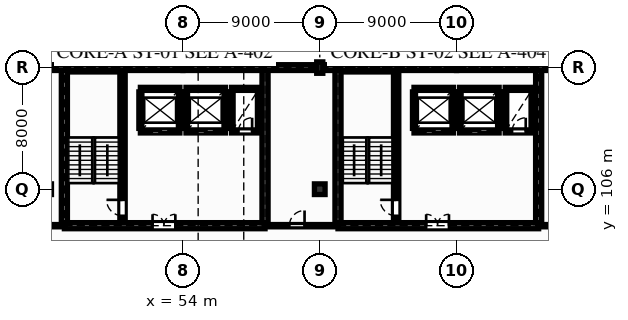
"""IFC4 building model, lengths in metres.
Left out: names, types, materials, properties, quantities, classifications, styles, units other than length and angle.
Written with IfcOpenShell. Run it as: python <this file> out.ifc"""

import sys

from ifc_helpers import new_model, si_unit, direction, frame, frame_2d, origin, origin_2d, place, context, subcontext, project, spatial, rectangle, extrude, element, fill, save


model = new_model("IFC4")
c1 = context("Model", 3, precision=1e-05, world=origin(), true_north=direction((0.0, 1.0)))
c2 = subcontext(c1, "Body", "Model", "MODEL_VIEW")
j1 = project(units=[si_unit("LENGTHUNIT", "METRE"), si_unit("PLANEANGLEUNIT", "RADIAN")], contexts=[c1])
p1 = place(None, origin())
s1 = spatial("IfcSite", under=j1, at=p1, CompositionType="ELEMENT")
p2 = place(p1, origin())
s2 = spatial("IfcBuilding", under=s1, at=p2, CompositionType="ELEMENT")
p3 = place(p2, frame((0.0, 0.0, 12.78)))
s3 = spatial("IfcBuildingStorey", under=s2, at=p3, CompositionType="ELEMENT", Elevation=12.78)
p4 = place(p3, frame((63.0, 106.0, 0.0), z_axis=(0.0, 0.0, 1.0), x_axis=(1.0, 0.0, 0.0)))
e1 = element("IfcColumn", 1, at=p4, inside=s3, PredefinedType="COLUMN", context=c2, shape_type="SweptSolid", body=[
    extrude(rectangle(XDim=0.7, YDim=0.7, at=origin_2d()), origin(), (0.0, 0.0, 1.0), 3.74),
])
p5 = place(p3, frame((63.0, 114.0, 0.0), z_axis=(0.0, 0.0, 1.0), x_axis=(0.0, 1.0, 0.0)))
e2 = element("IfcColumn", 2, at=p5, inside=s3, PredefinedType="COLUMN", context=c2, shape_type="SweptSolid", body=[
    extrude(rectangle(XDim=0.4, YDim=0.75, at=origin_2d()), origin(), (0.0, 0.0, 1.0), 3.74),
])
for number, where, z_axis, x_axis in (
    (3, (45.0, 114.0, 0.0), (0.0, 0.0, 1.0), (1.0, 0.0, 0.0)),
    (4, (54.0, 114.0, 0.0), (0.0, 0.0, 1.0), (1.0, 0.0, 0.0)),
    (5, (63.0, 114.0, 0.0), (0.0, 0.0, 1.0), (1.0, 0.0, 0.0)),
    (6, (72.0, 114.0, 0.0), (0.0, 0.0, 1.0), (1.0, 0.0, 0.0)),
):
    element("IfcWall", number, at=place(p3, frame(where, z_axis=z_axis, x_axis=x_axis)), inside=s3, PredefinedType="SOLIDWALL", context=c2, shape_type="SweptSolid", body=[
        extrude(rectangle(XDim=9.0, YDim=0.38, at=frame_2d((4.5, 0.0))), origin(), (0.0, 0.0, 1.0), 3.42),
    ])
p6 = place(p3, frame((46.2, 103.6, 0.0), z_axis=(0.0, 0.0, 1.0), x_axis=(1.0, 0.0, 0.0)))
e7 = element("IfcWall", 7, at=p6, inside=s3, PredefinedType="SHEAR", context=c2, shape_type="SweptSolid", body=[
    extrude(rectangle(XDim=13.2, YDim=0.4, at=frame_2d((6.6, 0.0))), origin(), (0.0, 0.0, 1.0), 3.42),
])
p7 = place(p6, frame((5.8, 0.0, 0.0)))
e8 = element("IfcOpeningElement", 8, at=p7, cuts=e7, PredefinedType="OPENING", context=c2, shape_type="SweptSolid", body=[
    extrude(rectangle(XDim=1.5, YDim=2.2, at=frame_2d((0.75, 1.1))), frame((0.0, 0.21, 0.0), z_axis=(0.0, -1.0, 0.0), x_axis=(1.0, 0.0, 0.0)), (0.0, 0.0, 1.0), 0.42),
])
for number, where, z_axis, x_axis in (
    (9, (46.2, 103.8, 0.0), (0.0, 0.0, 1.0), (0.0, 1.0, 0.0)),
    (10, (59.4, 103.8, 0.0), (0.0, 0.0, 1.0), (0.0, 1.0, 0.0)),
):
    element("IfcWall", number, at=place(p3, frame(where, z_axis=z_axis, x_axis=x_axis)), inside=s3, PredefinedType="SHEAR", context=c2, shape_type="SweptSolid", body=[
        extrude(rectangle(XDim=10.01, YDim=0.4, at=frame_2d((5.005, 0.0))), origin(), (0.0, 0.0, 1.0), 3.42),
    ])
p8 = place(p3, frame((50.025, 103.8, 0.0), z_axis=(0.0, 0.0, 1.0), x_axis=(0.0, 1.0, 0.0)))
e11 = element("IfcWall", 11, at=p8, inside=s3, PredefinedType="SHEAR", context=c2, shape_type="SweptSolid", body=[
    extrude(rectangle(XDim=10.01, YDim=0.35, at=frame_2d((5.005, 0.0))), origin(), (0.0, 0.0, 1.0), 3.42),
])
p9 = place(p8, frame((0.45, 0.0, 0.0)))
e12 = element("IfcOpeningElement", 12, at=p9, cuts=e11, PredefinedType="OPENING", context=c2, shape_type="SweptSolid", body=[
    extrude(rectangle(XDim=1.05, YDim=2.2, at=frame_2d((0.525, 1.1))), frame((0.0, 0.185, 0.0), z_axis=(0.0, -1.0, 0.0), x_axis=(1.0, 0.0, 0.0)), (0.0, 0.0, 1.0), 0.37),
])
p10 = place(p3, frame((51.2, 109.8, 0.0), z_axis=(0.0, 0.0, 1.0), x_axis=(1.0, 0.0, 0.0)))
e13 = element("IfcWall", 13, at=p10, inside=s3, PredefinedType="PARTITIONING", context=c2, shape_type="SweptSolid", body=[
    extrude(rectangle(XDim=2.6, YDim=0.2, at=frame_2d((1.3, 0.0))), origin(), (0.0, 0.0, 1.0), 3.42),
])
p11 = place(p10, frame((0.75, 0.0, 0.0)))
e14 = element("IfcOpeningElement", 14, at=p11, cuts=e13, PredefinedType="OPENING", context=c2, shape_type="SweptSolid", body=[
    extrude(rectangle(XDim=1.1, YDim=2.15, at=frame_2d((0.55, 1.075))), frame((0.0, 0.11, 0.0), z_axis=(0.0, -1.0, 0.0), x_axis=(1.0, 0.0, 0.0)), (0.0, 0.0, 1.0), 0.22),
])
p12 = place(p3, frame((51.2, 112.6, 0.0), z_axis=(0.0, 0.0, 1.0), x_axis=(1.0, 0.0, 0.0)))
e15 = element("IfcWall", 15, at=p12, inside=s3, PredefinedType="PARTITIONING", context=c2, shape_type="SweptSolid", body=[
    extrude(rectangle(XDim=2.6, YDim=0.2, at=frame_2d((1.3, 0.0))), origin(), (0.0, 0.0, 1.0), 3.42),
])
for number, where, z_axis, x_axis in (
    (16, (51.2, 110.0, 0.0), (0.0, 0.0, 1.0), (0.0, 1.0, 0.0)),
    (17, (53.8, 110.0, 0.0), (0.0, 0.0, 1.0), (0.0, 1.0, 0.0)),
):
    element("IfcWall", number, at=place(p3, frame(where, z_axis=z_axis, x_axis=x_axis)), inside=s3, PredefinedType="PARTITIONING", context=c2, shape_type="SweptSolid", body=[
        extrude(rectangle(XDim=2.4, YDim=0.2, at=frame_2d((1.2, 0.0))), origin(), (0.0, 0.0, 1.0), 3.42),
    ])
p13 = place(p3, frame((54.2, 109.8, 0.0), z_axis=(0.0, 0.0, 1.0), x_axis=(1.0, 0.0, 0.0)))
e18 = element("IfcWall", 18, at=p13, inside=s3, PredefinedType="PARTITIONING", context=c2, shape_type="SweptSolid", body=[
    extrude(rectangle(XDim=2.6, YDim=0.2, at=frame_2d((1.3, 0.0))), origin(), (0.0, 0.0, 1.0), 3.42),
])
p14 = place(p13, frame((0.75, 0.0, 0.0)))
e19 = element("IfcOpeningElement", 19, at=p14, cuts=e18, PredefinedType="OPENING", context=c2, shape_type="SweptSolid", body=[
    extrude(rectangle(XDim=1.1, YDim=2.15, at=frame_2d((0.55, 1.075))), frame((0.0, 0.11, 0.0), z_axis=(0.0, -1.0, 0.0), x_axis=(1.0, 0.0, 0.0)), (0.0, 0.0, 1.0), 0.22),
])
p15 = place(p3, frame((54.2, 112.6, 0.0), z_axis=(0.0, 0.0, 1.0), x_axis=(1.0, 0.0, 0.0)))
e20 = element("IfcWall", 20, at=p15, inside=s3, PredefinedType="PARTITIONING", context=c2, shape_type="SweptSolid", body=[
    extrude(rectangle(XDim=2.6, YDim=0.2, at=frame_2d((1.3, 0.0))), origin(), (0.0, 0.0, 1.0), 3.42),
])
for number, where, z_axis, x_axis in (
    (21, (54.2, 110.0, 0.0), (0.0, 0.0, 1.0), (0.0, 1.0, 0.0)),
    (22, (56.8, 110.0, 0.0), (0.0, 0.0, 1.0), (0.0, 1.0, 0.0)),
):
    element("IfcWall", number, at=place(p3, frame(where, z_axis=z_axis, x_axis=x_axis)), inside=s3, PredefinedType="PARTITIONING", context=c2, shape_type="SweptSolid", body=[
        extrude(rectangle(XDim=2.4, YDim=0.2, at=frame_2d((1.2, 0.0))), origin(), (0.0, 0.0, 1.0), 3.42),
    ])
p16 = place(p3, frame((57.2, 109.8, 0.0), z_axis=(0.0, 0.0, 1.0), x_axis=(1.0, 0.0, 0.0)))
e23 = element("IfcWall", 23, at=p16, inside=s3, PredefinedType="PARTITIONING", context=c2, shape_type="SweptSolid", body=[
    extrude(rectangle(XDim=1.8, YDim=0.2, at=frame_2d((0.9, 0.0))), origin(), (0.0, 0.0, 1.0), 3.42),
])
p17 = place(p16, frame((0.45, 0.0, 0.0)))
e24 = element("IfcOpeningElement", 24, at=p17, cuts=e23, PredefinedType="OPENING", context=c2, shape_type="SweptSolid", body=[
    extrude(rectangle(XDim=0.9, YDim=2.1, at=frame_2d((0.45, 1.05))), frame((0.0, 0.11, 0.0), z_axis=(0.0, -1.0, 0.0), x_axis=(1.0, 0.0, 0.0)), (0.0, 0.0, 1.0), 0.22),
])
p18 = place(p3, frame((57.2, 112.6, 0.0), z_axis=(0.0, 0.0, 1.0), x_axis=(1.0, 0.0, 0.0)))
e25 = element("IfcWall", 25, at=p18, inside=s3, PredefinedType="PARTITIONING", context=c2, shape_type="SweptSolid", body=[
    extrude(rectangle(XDim=1.8, YDim=0.2, at=frame_2d((0.9, 0.0))), origin(), (0.0, 0.0, 1.0), 3.42),
])
for number, where, z_axis, x_axis in (
    (26, (57.2, 110.0, 0.0), (0.0, 0.0, 1.0), (0.0, 1.0, 0.0)),
    (27, (59.0, 110.0, 0.0), (0.0, 0.0, 1.0), (0.0, 1.0, 0.0)),
):
    element("IfcWall", number, at=place(p3, frame(where, z_axis=z_axis, x_axis=x_axis)), inside=s3, PredefinedType="PARTITIONING", context=c2, shape_type="SweptSolid", body=[
        extrude(rectangle(XDim=2.4, YDim=0.2, at=frame_2d((1.2, 0.0))), origin(), (0.0, 0.0, 1.0), 3.42),
    ])
p19 = place(p3, frame((64.2, 103.6, 0.0), z_axis=(0.0, 0.0, 1.0), x_axis=(1.0, 0.0, 0.0)))
e28 = element("IfcWall", 28, at=p19, inside=s3, PredefinedType="SHEAR", context=c2, shape_type="SweptSolid", body=[
    extrude(rectangle(XDim=13.2, YDim=0.4, at=frame_2d((6.6, 0.0))), origin(), (0.0, 0.0, 1.0), 3.42),
])
p20 = place(p19, frame((5.8, 0.0, 0.0)))
e29 = element("IfcOpeningElement", 29, at=p20, cuts=e28, PredefinedType="OPENING", context=c2, shape_type="SweptSolid", body=[
    extrude(rectangle(XDim=1.5, YDim=2.2, at=frame_2d((0.75, 1.1))), frame((0.0, 0.21, 0.0), z_axis=(0.0, -1.0, 0.0), x_axis=(1.0, 0.0, 0.0)), (0.0, 0.0, 1.0), 0.42),
])
for number, where, z_axis, x_axis in (
    (30, (64.2, 103.8, 0.0), (0.0, 0.0, 1.0), (0.0, 1.0, 0.0)),
    (31, (77.4, 103.8, 0.0), (0.0, 0.0, 1.0), (0.0, 1.0, 0.0)),
):
    element("IfcWall", number, at=place(p3, frame(where, z_axis=z_axis, x_axis=x_axis)), inside=s3, PredefinedType="SHEAR", context=c2, shape_type="SweptSolid", body=[
        extrude(rectangle(XDim=10.01, YDim=0.4, at=frame_2d((5.005, 0.0))), origin(), (0.0, 0.0, 1.0), 3.42),
    ])
p21 = place(p3, frame((68.025, 103.8, 0.0), z_axis=(0.0, 0.0, 1.0), x_axis=(0.0, 1.0, 0.0)))
e32 = element("IfcWall", 32, at=p21, inside=s3, PredefinedType="SHEAR", context=c2, shape_type="SweptSolid", body=[
    extrude(rectangle(XDim=10.01, YDim=0.35, at=frame_2d((5.005, 0.0))), origin(), (0.0, 0.0, 1.0), 3.42),
])
p22 = place(p21, frame((0.45, 0.0, 0.0)))
e33 = element("IfcOpeningElement", 33, at=p22, cuts=e32, PredefinedType="OPENING", context=c2, shape_type="SweptSolid", body=[
    extrude(rectangle(XDim=1.05, YDim=2.2, at=frame_2d((0.525, 1.1))), frame((0.0, 0.185, 0.0), z_axis=(0.0, -1.0, 0.0), x_axis=(1.0, 0.0, 0.0)), (0.0, 0.0, 1.0), 0.37),
])
p23 = place(p3, frame((69.2, 109.8, 0.0), z_axis=(0.0, 0.0, 1.0), x_axis=(1.0, 0.0, 0.0)))
e34 = element("IfcWall", 34, at=p23, inside=s3, PredefinedType="PARTITIONING", context=c2, shape_type="SweptSolid", body=[
    extrude(rectangle(XDim=2.6, YDim=0.2, at=frame_2d((1.3, 0.0))), origin(), (0.0, 0.0, 1.0), 3.42),
])
p24 = place(p23, frame((0.75, 0.0, 0.0)))
e35 = element("IfcOpeningElement", 35, at=p24, cuts=e34, PredefinedType="OPENING", context=c2, shape_type="SweptSolid", body=[
    extrude(rectangle(XDim=1.1, YDim=2.15, at=frame_2d((0.55, 1.075))), frame((0.0, 0.11, 0.0), z_axis=(0.0, -1.0, 0.0), x_axis=(1.0, 0.0, 0.0)), (0.0, 0.0, 1.0), 0.22),
])
p25 = place(p3, frame((69.2, 112.6, 0.0), z_axis=(0.0, 0.0, 1.0), x_axis=(1.0, 0.0, 0.0)))
e36 = element("IfcWall", 36, at=p25, inside=s3, PredefinedType="PARTITIONING", context=c2, shape_type="SweptSolid", body=[
    extrude(rectangle(XDim=2.6, YDim=0.2, at=frame_2d((1.3, 0.0))), origin(), (0.0, 0.0, 1.0), 3.42),
])
for number, where, z_axis, x_axis in (
    (37, (69.2, 110.0, 0.0), (0.0, 0.0, 1.0), (0.0, 1.0, 0.0)),
    (38, (71.8, 110.0, 0.0), (0.0, 0.0, 1.0), (0.0, 1.0, 0.0)),
):
    element("IfcWall", number, at=place(p3, frame(where, z_axis=z_axis, x_axis=x_axis)), inside=s3, PredefinedType="PARTITIONING", context=c2, shape_type="SweptSolid", body=[
        extrude(rectangle(XDim=2.4, YDim=0.2, at=frame_2d((1.2, 0.0))), origin(), (0.0, 0.0, 1.0), 3.42),
    ])
p26 = place(p3, frame((72.2, 109.8, 0.0), z_axis=(0.0, 0.0, 1.0), x_axis=(1.0, 0.0, 0.0)))
e39 = element("IfcWall", 39, at=p26, inside=s3, PredefinedType="PARTITIONING", context=c2, shape_type="SweptSolid", body=[
    extrude(rectangle(XDim=2.6, YDim=0.2, at=frame_2d((1.3, 0.0))), origin(), (0.0, 0.0, 1.0), 3.42),
])
p27 = place(p26, frame((0.75, 0.0, 0.0)))
e40 = element("IfcOpeningElement", 40, at=p27, cuts=e39, PredefinedType="OPENING", context=c2, shape_type="SweptSolid", body=[
    extrude(rectangle(XDim=1.1, YDim=2.15, at=frame_2d((0.55, 1.075))), frame((0.0, 0.11, 0.0), z_axis=(0.0, -1.0, 0.0), x_axis=(1.0, 0.0, 0.0)), (0.0, 0.0, 1.0), 0.22),
])
p28 = place(p3, frame((72.2, 112.6, 0.0), z_axis=(0.0, 0.0, 1.0), x_axis=(1.0, 0.0, 0.0)))
e41 = element("IfcWall", 41, at=p28, inside=s3, PredefinedType="PARTITIONING", context=c2, shape_type="SweptSolid", body=[
    extrude(rectangle(XDim=2.6, YDim=0.2, at=frame_2d((1.3, 0.0))), origin(), (0.0, 0.0, 1.0), 3.42),
])
for number, where, z_axis, x_axis in (
    (42, (72.2, 110.0, 0.0), (0.0, 0.0, 1.0), (0.0, 1.0, 0.0)),
    (43, (74.8, 110.0, 0.0), (0.0, 0.0, 1.0), (0.0, 1.0, 0.0)),
):
    element("IfcWall", number, at=place(p3, frame(where, z_axis=z_axis, x_axis=x_axis)), inside=s3, PredefinedType="PARTITIONING", context=c2, shape_type="SweptSolid", body=[
        extrude(rectangle(XDim=2.4, YDim=0.2, at=frame_2d((1.2, 0.0))), origin(), (0.0, 0.0, 1.0), 3.42),
    ])
p29 = place(p3, frame((75.2, 109.8, 0.0), z_axis=(0.0, 0.0, 1.0), x_axis=(1.0, 0.0, 0.0)))
e44 = element("IfcWall", 44, at=p29, inside=s3, PredefinedType="PARTITIONING", context=c2, shape_type="SweptSolid", body=[
    extrude(rectangle(XDim=1.8, YDim=0.2, at=frame_2d((0.9, 0.0))), origin(), (0.0, 0.0, 1.0), 3.42),
])
p30 = place(p29, frame((0.45, 0.0, 0.0)))
e45 = element("IfcOpeningElement", 45, at=p30, cuts=e44, PredefinedType="OPENING", context=c2, shape_type="SweptSolid", body=[
    extrude(rectangle(XDim=0.9, YDim=2.1, at=frame_2d((0.45, 1.05))), frame((0.0, 0.11, 0.0), z_axis=(0.0, -1.0, 0.0), x_axis=(1.0, 0.0, 0.0)), (0.0, 0.0, 1.0), 0.22),
])
p31 = place(p3, frame((75.2, 112.6, 0.0), z_axis=(0.0, 0.0, 1.0), x_axis=(1.0, 0.0, 0.0)))
e46 = element("IfcWall", 46, at=p31, inside=s3, PredefinedType="PARTITIONING", context=c2, shape_type="SweptSolid", body=[
    extrude(rectangle(XDim=1.8, YDim=0.2, at=frame_2d((0.9, 0.0))), origin(), (0.0, 0.0, 1.0), 3.42),
])
for number, where, z_axis, x_axis in (
    (47, (75.2, 110.0, 0.0), (0.0, 0.0, 1.0), (0.0, 1.0, 0.0)),
    (48, (77.0, 110.0, 0.0), (0.0, 0.0, 1.0), (0.0, 1.0, 0.0)),
):
    element("IfcWall", number, at=place(p3, frame(where, z_axis=z_axis, x_axis=x_axis)), inside=s3, PredefinedType="PARTITIONING", context=c2, shape_type="SweptSolid", body=[
        extrude(rectangle(XDim=2.4, YDim=0.2, at=frame_2d((1.2, 0.0))), origin(), (0.0, 0.0, 1.0), 3.42),
    ])
p32 = place(p3, frame((36.0, 103.6, 0.0), z_axis=(0.0, 0.0, 1.0), x_axis=(1.0, 0.0, 0.0)))
e49 = element("IfcWall", 49, at=p32, inside=s3, PredefinedType="PARTITIONING", context=c2, shape_type="SweptSolid", body=[
    extrude(rectangle(XDim=10.2, YDim=0.15, at=frame_2d((5.1, 0.0))), origin(), (0.0, 0.0, 1.0), 3.42),
])
p33 = place(p32, frame((4.4, 0.0, 0.0)))
e50 = element("IfcOpeningElement", 50, at=p33, cuts=e49, PredefinedType="OPENING", context=c2, shape_type="SweptSolid", body=[
    extrude(rectangle(XDim=1.0, YDim=2.15, at=frame_2d((0.5, 1.075))), frame((0.0, 0.085, 0.0), z_axis=(0.0, -1.0, 0.0), x_axis=(1.0, 0.0, 0.0)), (0.0, 0.0, 1.0), 0.17),
])
p34 = place(p3, frame((59.4, 103.6, 0.0), z_axis=(0.0, 0.0, 1.0), x_axis=(1.0, 0.0, 0.0)))
e51 = element("IfcWall", 51, at=p34, inside=s3, PredefinedType="PARTITIONING", context=c2, shape_type="SweptSolid", body=[
    extrude(rectangle(XDim=4.8, YDim=0.15, at=frame_2d((2.4, 0.0))), origin(), (0.0, 0.0, 1.0), 3.42),
])
p35 = place(p34, frame((1.6, 0.0, 0.0)))
e52 = element("IfcOpeningElement", 52, at=p35, cuts=e51, PredefinedType="OPENING", context=c2, shape_type="SweptSolid", body=[
    extrude(rectangle(XDim=1.0, YDim=2.15, at=frame_2d((0.5, 1.075))), frame((0.0, 0.085, 0.0), z_axis=(0.0, -1.0, 0.0), x_axis=(1.0, 0.0, 0.0)), (0.0, 0.0, 1.0), 0.17),
])
p36 = place(p3, frame((77.4, 103.6, 0.0), z_axis=(0.0, 0.0, 1.0), x_axis=(1.0, 0.0, 0.0)))
e53 = element("IfcWall", 53, at=p36, inside=s3, PredefinedType="PARTITIONING", context=c2, shape_type="SweptSolid", body=[
    extrude(rectangle(XDim=12.6, YDim=0.15, at=frame_2d((6.3, 0.0))), origin(), (0.0, 0.0, 1.0), 3.42),
])
p37 = place(p36, frame((5.6, 0.0, 0.0)))
e54 = element("IfcOpeningElement", 54, at=p37, cuts=e53, PredefinedType="OPENING", context=c2, shape_type="SweptSolid", body=[
    extrude(rectangle(XDim=1.0, YDim=2.15, at=frame_2d((0.5, 1.075))), frame((0.0, 0.085, 0.0), z_axis=(0.0, -1.0, 0.0), x_axis=(1.0, 0.0, 0.0)), (0.0, 0.0, 1.0), 0.17),
])
p38 = place(p7, origin())
e55 = element("IfcDoor", 55, at=p38, inside=s3, OperationType="DOUBLE_DOOR_SINGLE_SWING", PredefinedType="DOOR", context=c2, shape_type="SweptSolid", body=[
    extrude(rectangle(XDim=1.5, YDim=2.2, at=frame_2d((0.75, 1.1))), frame((0.0, 0.025, 0.0), z_axis=(0.0, -1.0, 0.0), x_axis=(1.0, 0.0, 0.0)), (0.0, 0.0, 1.0), 0.05),
])
fill(e8, e55)
p39 = place(p9, origin())
e56 = element("IfcDoor", 56, at=p39, inside=s3, OperationType="SINGLE_SWING_RIGHT", PredefinedType="DOOR", context=c2, shape_type="SweptSolid", body=[
    extrude(rectangle(XDim=1.05, YDim=2.2, at=frame_2d((0.525, 1.1))), frame((0.0, 0.025, 0.0), z_axis=(0.0, -1.0, 0.0), x_axis=(1.0, 0.0, 0.0)), (0.0, 0.0, 1.0), 0.05),
])
fill(e12, e56)
p40 = place(p11, origin())
e57 = element("IfcDoor", 57, at=p40, inside=s3, OperationType="SLIDING_TO_LEFT", PredefinedType="DOOR", context=c2, shape_type="SweptSolid", body=[
    extrude(rectangle(XDim=1.1, YDim=2.15, at=frame_2d((0.55, 1.075))), frame((0.0, 0.025, 0.0), z_axis=(0.0, -1.0, 0.0), x_axis=(1.0, 0.0, 0.0)), (0.0, 0.0, 1.0), 0.05),
])
fill(e14, e57)
p41 = place(p14, origin())
e58 = element("IfcDoor", 58, at=p41, inside=s3, OperationType="SLIDING_TO_RIGHT", PredefinedType="DOOR", context=c2, shape_type="SweptSolid", body=[
    extrude(rectangle(XDim=1.1, YDim=2.15, at=frame_2d((0.55, 1.075))), frame((0.0, 0.025, 0.0), z_axis=(0.0, -1.0, 0.0), x_axis=(1.0, 0.0, 0.0)), (0.0, 0.0, 1.0), 0.05),
])
fill(e19, e58)
p42 = place(p17, origin())
e59 = element("IfcDoor", 59, at=p42, inside=s3, OperationType="SINGLE_SWING_RIGHT", PredefinedType="DOOR", context=c2, shape_type="SweptSolid", body=[
    extrude(rectangle(XDim=0.9, YDim=2.1, at=frame_2d((0.45, 1.05))), frame((0.0, 0.025, 0.0), z_axis=(0.0, -1.0, 0.0), x_axis=(1.0, 0.0, 0.0)), (0.0, 0.0, 1.0), 0.05),
])
fill(e24, e59)
p43 = place(p20, origin())
e60 = element("IfcDoor", 60, at=p43, inside=s3, OperationType="DOUBLE_DOOR_SINGLE_SWING", PredefinedType="DOOR", context=c2, shape_type="SweptSolid", body=[
    extrude(rectangle(XDim=1.5, YDim=2.2, at=frame_2d((0.75, 1.1))), frame((0.0, 0.025, 0.0), z_axis=(0.0, -1.0, 0.0), x_axis=(1.0, 0.0, 0.0)), (0.0, 0.0, 1.0), 0.05),
])
fill(e29, e60)
p44 = place(p22, origin())
e61 = element("IfcDoor", 61, at=p44, inside=s3, OperationType="SINGLE_SWING_RIGHT", PredefinedType="DOOR", context=c2, shape_type="SweptSolid", body=[
    extrude(rectangle(XDim=1.05, YDim=2.2, at=frame_2d((0.525, 1.1))), frame((0.0, 0.025, 0.0), z_axis=(0.0, -1.0, 0.0), x_axis=(1.0, 0.0, 0.0)), (0.0, 0.0, 1.0), 0.05),
])
fill(e33, e61)
p45 = place(p24, origin())
e62 = element("IfcDoor", 62, at=p45, inside=s3, OperationType="SLIDING_TO_LEFT", PredefinedType="DOOR", context=c2, shape_type="SweptSolid", body=[
    extrude(rectangle(XDim=1.1, YDim=2.15, at=frame_2d((0.55, 1.075))), frame((0.0, 0.025, 0.0), z_axis=(0.0, -1.0, 0.0), x_axis=(1.0, 0.0, 0.0)), (0.0, 0.0, 1.0), 0.05),
])
fill(e35, e62)
p46 = place(p27, origin())
e63 = element("IfcDoor", 63, at=p46, inside=s3, OperationType="SLIDING_TO_RIGHT", PredefinedType="DOOR", context=c2, shape_type="SweptSolid", body=[
    extrude(rectangle(XDim=1.1, YDim=2.15, at=frame_2d((0.55, 1.075))), frame((0.0, 0.025, 0.0), z_axis=(0.0, -1.0, 0.0), x_axis=(1.0, 0.0, 0.0)), (0.0, 0.0, 1.0), 0.05),
])
fill(e40, e63)
p47 = place(p30, origin())
e64 = element("IfcDoor", 64, at=p47, inside=s3, OperationType="SINGLE_SWING_RIGHT", PredefinedType="DOOR", context=c2, shape_type="SweptSolid", body=[
    extrude(rectangle(XDim=0.9, YDim=2.1, at=frame_2d((0.45, 1.05))), frame((0.0, 0.025, 0.0), z_axis=(0.0, -1.0, 0.0), x_axis=(1.0, 0.0, 0.0)), (0.0, 0.0, 1.0), 0.05),
])
fill(e45, e64)
p48 = place(p35, origin())
e65 = element("IfcDoor", 65, at=p48, inside=s3, OperationType="SINGLE_SWING_RIGHT", PredefinedType="DOOR", context=c2, shape_type="SweptSolid", body=[
    extrude(rectangle(XDim=1.0, YDim=2.15, at=frame_2d((0.5, 1.075))), frame((0.0, 0.025, 0.0), z_axis=(0.0, -1.0, 0.0), x_axis=(1.0, 0.0, 0.0)), (0.0, 0.0, 1.0), 0.05),
])
fill(e52, e65)
save(model, sys.argv[1])
